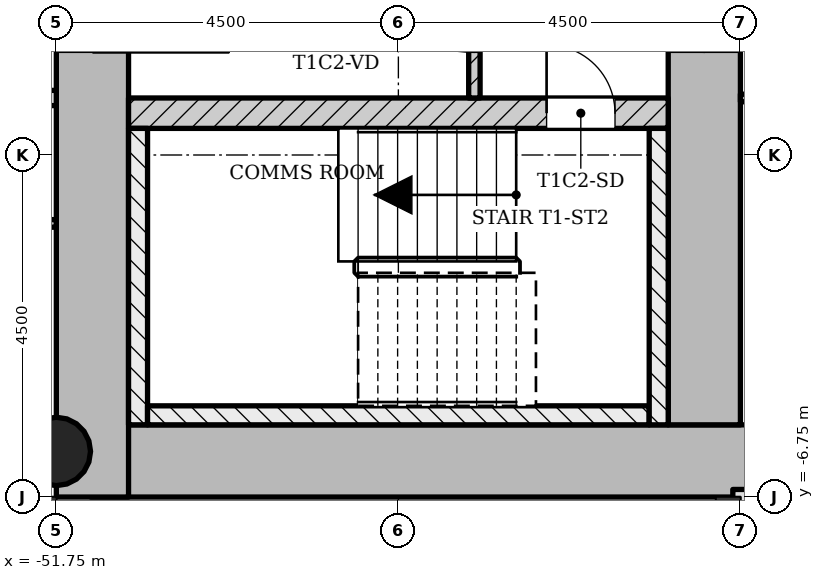
"""IFC4 building model, lengths in metres.
Left out: names, types, materials, properties, quantities, classifications, styles, units other than length and angle.
Written with IfcOpenShell. Run it as: python <this file> out.ifc"""

import sys

from ifc_helpers import new_model, si_unit, direction, frame, frame_2d, origin, origin_2d, place, context, subcontext, project, spatial, rectangle, hollow_circle, extrude, element, fill, save


model = new_model("IFC4")
c1 = context("Model", 3, precision=1e-05, world=origin(), true_north=direction((0.0, 1.0)))
c2 = subcontext(c1, "Body", "Model", "MODEL_VIEW")
j1 = project(units=[si_unit("LENGTHUNIT", "METRE"), si_unit("PLANEANGLEUNIT", "RADIAN")], contexts=[c1])
p1 = place(None, origin())
s1 = spatial("IfcSite", under=j1, at=p1, CompositionType="ELEMENT")
p2 = place(p1, origin())
s2 = spatial("IfcBuilding", under=s1, at=p2, CompositionType="ELEMENT")
p3 = place(p2, frame((0.0, 0.0, 80.0)))
s3 = spatial("IfcBuildingStorey", under=s2, at=p3, CompositionType="ELEMENT", Elevation=80.0)
p4 = place(p3, frame((-51.298, -6.275, 0.0), z_axis=(0.0, 0.0, 1.0), x_axis=(1.0, 0.0, 0.0)))
e1 = element("IfcWall", 1, at=p4, inside=s3, PredefinedType="SHEAR", context=c2, shape_type="SweptSolid", body=[
    extrude(rectangle(XDim=8.696, YDim=0.95, at=frame_2d((4.348, 0.0))), origin(), (0.0, 0.0, 1.0), 3.4),
])
p5 = place(p3, frame((-43.225, -5.8, 0.0), z_axis=(0.0, 0.0, 1.0), x_axis=(0.0, 1.0, 0.0)))
e2 = element("IfcWall", 2, at=p5, inside=s3, PredefinedType="SHEAR", context=c2, shape_type="SweptSolid", body=[
    extrude(rectangle(XDim=12.55, YDim=0.95, at=frame_2d((6.275, 0.0))), origin(), (0.0, 0.0, 1.0), 3.4),
])
p6 = place(p5, frame((4.9, 0.0, 0.0)))
e3 = element("IfcOpeningElement", 3, at=p6, cuts=e2, PredefinedType="OPENING", context=c2, shape_type="SweptSolid", body=[
    extrude(rectangle(XDim=1.8, YDim=2.1, at=frame_2d((0.9, 1.05))), frame((0.0, 0.485, 0.0), z_axis=(0.0, -1.0, 0.0), x_axis=(1.0, 0.0, 0.0)), (0.0, 0.0, 1.0), 0.97),
])
p7 = place(p3, frame((-51.275, 5.8, 0.0), z_axis=(0.0, 0.0, 1.0), x_axis=(0.0, -1.0, 0.0)))
e4 = element("IfcWall", 4, at=p7, inside=s3, PredefinedType="SHEAR", context=c2, shape_type="SweptSolid", body=[
    extrude(rectangle(XDim=12.55, YDim=0.95, at=frame_2d((6.275, 0.0))), origin(), (0.0, 0.0, 1.0), 3.4),
])
p8 = place(p7, frame((4.9, 0.0, 0.0)))
e5 = element("IfcOpeningElement", 5, at=p8, cuts=e4, PredefinedType="OPENING", context=c2, shape_type="SweptSolid", body=[
    extrude(rectangle(XDim=1.8, YDim=2.1, at=frame_2d((0.9, 1.05))), frame((0.0, 0.485, 0.0), z_axis=(0.0, -1.0, 0.0), x_axis=(1.0, 0.0, 0.0)), (0.0, 0.0, 1.0), 0.97),
])
p9 = place(p3, frame((-50.8, -1.7, 0.0), z_axis=(0.0, 0.0, 1.0), x_axis=(1.0, 0.0, 0.0)))
e6 = element("IfcWall", 6, at=p9, inside=s3, PredefinedType="SHEAR", context=c2, shape_type="SweptSolid", body=[
    extrude(rectangle(XDim=7.1, YDim=0.4, at=frame_2d((3.55, 0.0))), origin(), (0.0, 0.0, 1.0), 3.4),
])
p10 = place(p9, frame((5.5, 0.0, 0.0)))
e7 = element("IfcOpeningElement", 7, at=p10, cuts=e6, PredefinedType="OPENING", context=c2, shape_type="SweptSolid", body=[
    extrude(rectangle(XDim=0.9, YDim=2.1, at=frame_2d((0.45, 1.05))), frame((0.0, 0.21, 0.0), z_axis=(0.0, -1.0, 0.0), x_axis=(1.0, 0.0, 0.0)), (0.0, 0.0, 1.0), 0.42),
])
p11 = place(p3, frame((-51.75, -6.15, 0.0), z_axis=(0.0, 0.0, 1.0), x_axis=(1.0, 0.0, 0.0)))
e8 = element("IfcColumn", 8, at=p11, inside=s3, PredefinedType="COLUMN", context=c2, shape_type="SweptSolid", body=[
    extrude(hollow_circle(Radius=0.45, WallThickness=0.032, at=origin_2d()), origin(), (0.0, 0.0, 1.0), 3.4),
])
p12 = place(p3, frame((-46.25, 1.5, 0.0), z_axis=(0.0, 0.0, 1.0), x_axis=(0.0, -1.0, 0.0)))
e9 = element("IfcWall", 9, at=p12, inside=s3, PredefinedType="PARTITIONING", context=c2, shape_type="SweptSolid", body=[
    extrude(rectangle(XDim=3.0, YDim=0.15, at=frame_2d((1.5, 0.0))), origin(), (0.0, 0.0, 1.0), 3.0),
])
p13 = place(p12, frame((0.6, 0.0, 0.0)))
e10 = element("IfcOpeningElement", 10, at=p13, cuts=e9, PredefinedType="OPENING", context=c2, shape_type="SweptSolid", body=[
    extrude(rectangle(XDim=1.8, YDim=2.1, at=frame_2d((0.9, 1.05))), frame((0.0, 0.085, 0.0), z_axis=(0.0, -1.0, 0.0), x_axis=(1.0, 0.0, 0.0)), (0.0, 0.0, 1.0), 0.17),
])
p14 = place(p3, frame((-42.85, -6.75, 0.0), z_axis=(0.0, 0.0, 1.0), x_axis=(1.0, 0.0, 0.0)))
e11 = element("IfcWall", 11, at=p14, inside=s3, PredefinedType="SOLIDWALL", context=c2, shape_type="SweptSolid", body=[
    extrude(rectangle(XDim=5.95, YDim=0.2, at=frame_2d((2.975, 0.0))), origin(), (0.0, 0.0, 1.0), 3.0),
])
p15 = place(p3, frame((-56.25, -3.15, 0.0), z_axis=(0.0, 0.0, 1.0), x_axis=(1.0, 0.0, 0.0)))
e12 = element("IfcWall", 12, at=p15, inside=s3, PredefinedType="PARTITIONING", context=c2, shape_type="SweptSolid", body=[
    extrude(rectangle(XDim=4.5, YDim=0.1, at=frame_2d((2.25, 0.0))), origin(), (0.0, 0.0, 1.0), 3.0),
])
p16 = place(p15, frame((0.6, 0.0, 0.0)))
e13 = element("IfcOpeningElement", 13, at=p16, cuts=e12, PredefinedType="OPENING", context=c2, shape_type="SweptSolid", body=[
    extrude(rectangle(XDim=0.9, YDim=2.1, at=frame_2d((0.45, 1.05))), frame((0.0, 0.06, 0.0), z_axis=(0.0, -1.0, 0.0), x_axis=(1.0, 0.0, 0.0)), (0.0, 0.0, 1.0), 0.12),
])
p17 = place(p3, frame((-42.75, -1.5, 0.0), z_axis=(0.0, 0.0, 1.0), x_axis=(1.0, 0.0, 0.0)))
e14 = element("IfcWall", 14, at=p17, inside=s3, PredefinedType="PARTITIONING", context=c2, shape_type="SweptSolid", body=[
    extrude(rectangle(XDim=5.85, YDim=0.1, at=frame_2d((2.925, 0.0))), origin(), (0.0, 0.0, 1.0), 3.0),
])
p18 = place(p17, frame((0.975, 0.0, 0.0)))
e15 = element("IfcOpeningElement", 15, at=p18, cuts=e14, PredefinedType="OPENING", context=c2, shape_type="SweptSolid", body=[
    extrude(rectangle(XDim=0.9, YDim=2.1, at=frame_2d((0.45, 1.05))), frame((0.0, 0.06, 0.0), z_axis=(0.0, -1.0, 0.0), x_axis=(1.0, 0.0, 0.0)), (0.0, 0.0, 1.0), 0.12),
])
p19 = place(p3, frame((-56.25, -1.5, 0.0), z_axis=(0.0, 0.0, 1.0), x_axis=(1.0, 0.0, 0.0)))
e16 = element("IfcWall", 16, at=p19, inside=s3, PredefinedType="SOLIDWALL", context=c2, shape_type="SweptSolid", body=[
    extrude(rectangle(XDim=4.5, YDim=0.2, at=frame_2d((2.25, 0.0))), origin(), (0.0, 0.0, 1.0), 3.0),
])
p20 = place(p19, frame((0.6, 0.0, 0.0)))
e17 = element("IfcOpeningElement", 17, at=p20, cuts=e16, PredefinedType="OPENING", context=c2, shape_type="SweptSolid", body=[
    extrude(rectangle(XDim=0.9, YDim=2.1, at=frame_2d((0.45, 1.05))), frame((0.0, 0.11, 0.0), z_axis=(0.0, -1.0, 0.0), x_axis=(1.0, 0.0, 0.0)), (0.0, 0.0, 1.0), 0.22),
])
p21 = place(p3, frame((-50.675, -1.9, 0.0), z_axis=(0.0, 0.0, 1.0), x_axis=(0.0, -1.0, 0.0)))
e18 = element("IfcWall", 18, at=p21, inside=s3, PredefinedType="SHEAR", context=c2, shape_type="SweptSolid", body=[
    extrude(rectangle(XDim=3.9, YDim=0.25, at=frame_2d((1.95, 0.0))), origin(), (0.0, 0.0, 1.0), 3.4),
])
p22 = place(p3, frame((-43.95, -5.675, 0.0), z_axis=(0.0, 0.0, 1.0), x_axis=(-1.0, 0.0, 0.0)))
e19 = element("IfcWall", 19, at=p22, inside=s3, PredefinedType="SHEAR", context=c2, shape_type="SweptSolid", body=[
    extrude(rectangle(XDim=6.6, YDim=0.25, at=frame_2d((3.3, 0.0))), origin(), (0.0, 0.0, 1.0), 3.4),
])
p23 = place(p3, frame((-43.825, -1.9, 0.0), z_axis=(0.0, 0.0, 1.0), x_axis=(0.0, -1.0, 0.0)))
e20 = element("IfcWall", 20, at=p23, inside=s3, PredefinedType="SHEAR", context=c2, shape_type="SweptSolid", body=[
    extrude(rectangle(XDim=3.9, YDim=0.25, at=frame_2d((1.95, 0.0))), origin(), (0.0, 0.0, 1.0), 3.4),
])
p24 = place(p13, origin())
e21 = element("IfcDoor", 21, at=p24, inside=s3, OperationType="SINGLE_SWING_LEFT", PredefinedType="DOOR", context=c2, shape_type="SweptSolid", body=[
    extrude(rectangle(XDim=1.8, YDim=2.1, at=frame_2d((0.9, 1.05))), frame((0.0, 0.025, 0.0), z_axis=(0.0, -1.0, 0.0), x_axis=(1.0, 0.0, 0.0)), (0.0, 0.0, 1.0), 0.05),
])
fill(e10, e21)
p25 = place(p10, origin())
e22 = element("IfcDoor", 22, at=p25, inside=s3, OperationType="SINGLE_SWING_RIGHT", PredefinedType="DOOR", context=c2, shape_type="SweptSolid", body=[
    extrude(rectangle(XDim=0.9, YDim=2.1, at=frame_2d((0.45, 1.05))), frame((0.0, 0.025, 0.0), z_axis=(0.0, -1.0, 0.0), x_axis=(1.0, 0.0, 0.0)), (0.0, 0.0, 1.0), 0.05),
])
fill(e7, e22)
p26 = place(p6, origin())
e23 = element("IfcDoor", 23, at=p26, inside=s3, OperationType="SINGLE_SWING_LEFT", PredefinedType="DOOR", context=c2, shape_type="SweptSolid", body=[
    extrude(rectangle(XDim=1.8, YDim=2.1, at=frame_2d((0.9, 1.05))), frame((0.0, 0.025, 0.0), z_axis=(0.0, -1.0, 0.0), x_axis=(1.0, 0.0, 0.0)), (0.0, 0.0, 1.0), 0.05),
])
fill(e3, e23)
save(model, sys.argv[1])
